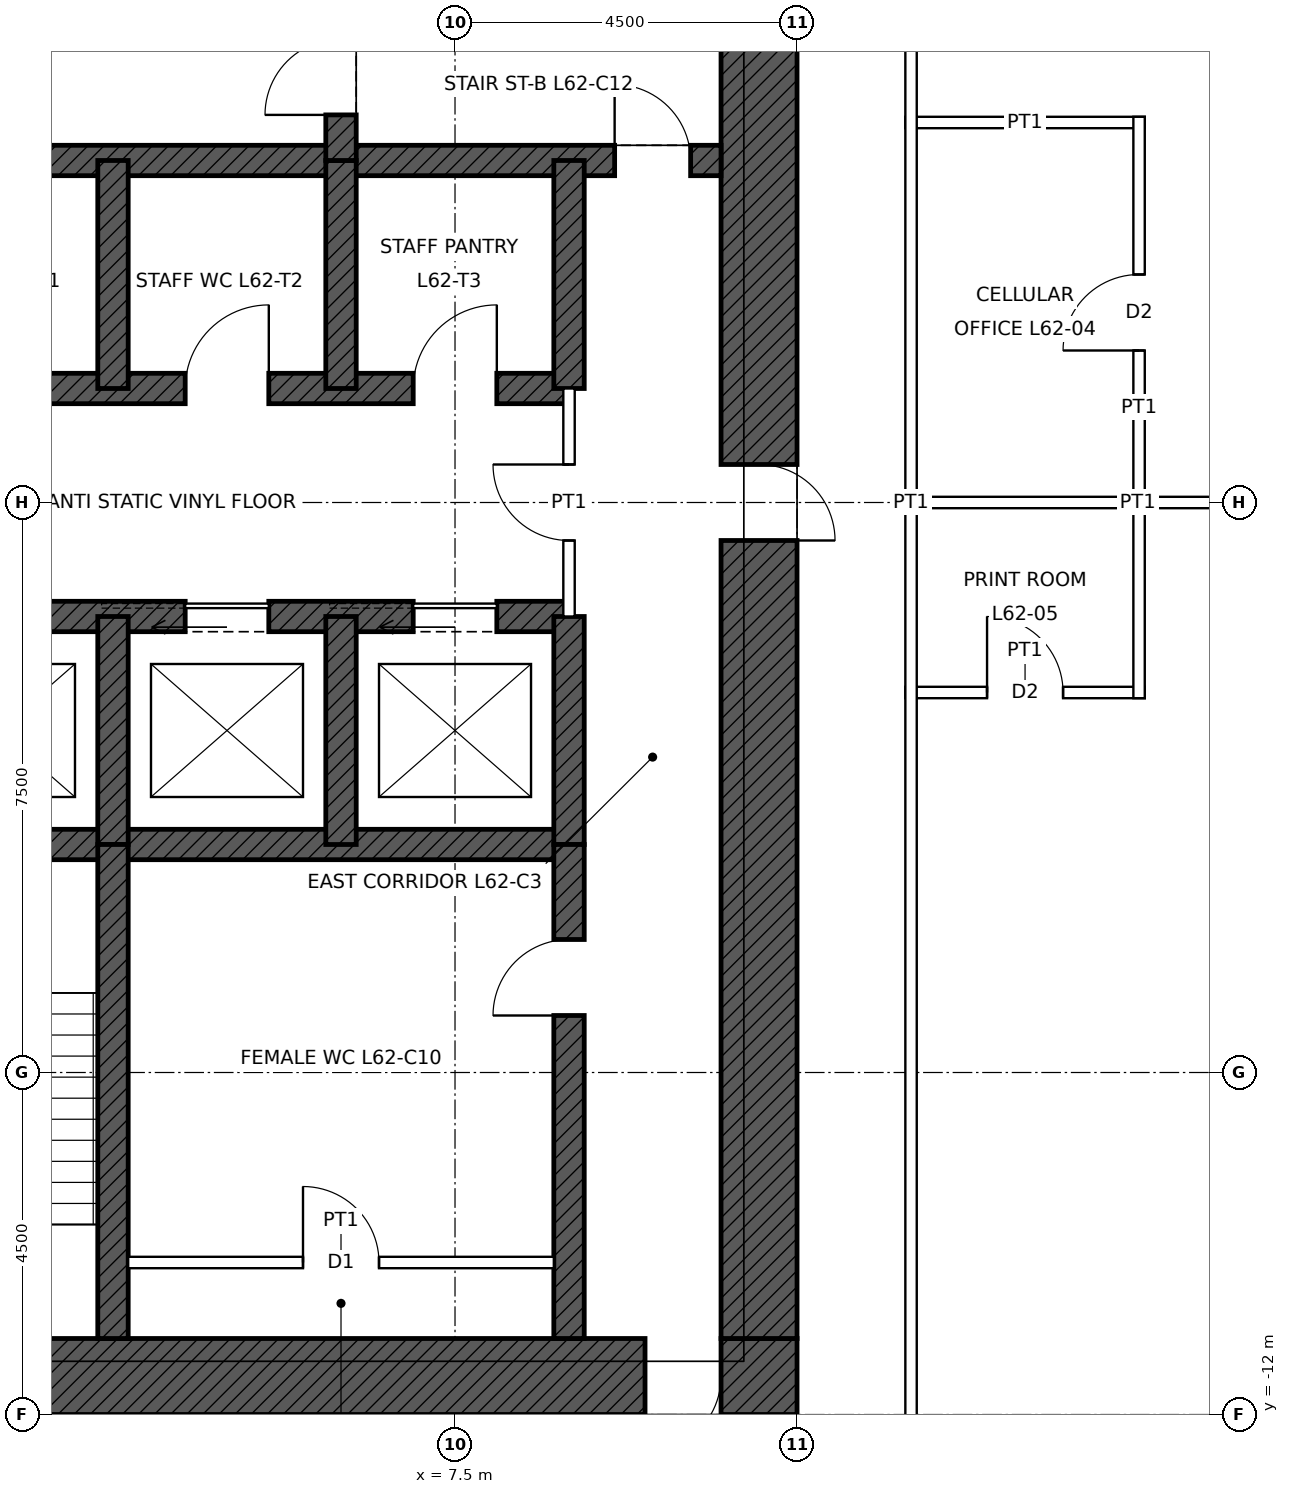
"""IFC4 building model, lengths in metres.
Left out: names, types, materials, properties, quantities, classifications, styles, units other than length and angle.
Written with IfcOpenShell. Run it as: python <this file> out.ifc"""

import sys

from ifc_helpers import new_model, si_unit, direction, frame, frame_2d, origin, place, context, subcontext, project, spatial, rectangle, extrude, element, fill, save


model = new_model("IFC4")
c1 = context("Model", 3, precision=1e-05, world=origin(), true_north=direction((0.0, 1.0)))
c2 = subcontext(c1, "Body", "Model", "MODEL_VIEW")
j1 = project(units=[si_unit("LENGTHUNIT", "METRE"), si_unit("PLANEANGLEUNIT", "RADIAN")], contexts=[c1])
p1 = place(None, origin())
s1 = spatial("IfcSite", under=j1, at=p1, CompositionType="ELEMENT")
p2 = place(p1, origin())
s2 = spatial("IfcBuilding", under=s1, at=p2, CompositionType="ELEMENT")
p3 = place(p2, frame((0.0, 0.0, 283.9)))
s3 = spatial("IfcBuildingStorey", under=s2, at=p3, CompositionType="ELEMENT", Elevation=283.9)
p4 = place(p3, frame((12.0, -11.5, 0.0), z_axis=(0.0, 0.0, 1.0), x_axis=(-1.0, 0.0, 0.0)))
e1 = element("IfcWall", 1, at=p4, inside=s3, PredefinedType="SHEAR", context=c2, shape_type="SweptSolid", body=[
    extrude(rectangle(XDim=24.0, YDim=1.0, at=frame_2d((12.0, 0.0))), origin(), (0.0, 0.0, 1.0), 4.0),
])
p5 = place(p4, frame((11.5, 0.0, 0.0)))
e2 = element("IfcOpeningElement", 2, at=p5, cuts=e1, PredefinedType="OPENING", context=c2, shape_type="SweptSolid", body=[
    extrude(rectangle(XDim=1.0, YDim=2.1, at=frame_2d((0.5, 1.05))), frame((0.0, 0.51, 0.0), z_axis=(0.0, -1.0, 0.0), x_axis=(1.0, 0.0, 0.0)), (0.0, 0.0, 1.0), 1.02),
])
p6 = place(p4, frame((1.0, 0.0, 0.0)))
e3 = element("IfcOpeningElement", 3, at=p6, cuts=e1, PredefinedType="OPENING", context=c2, shape_type="SweptSolid", body=[
    extrude(rectangle(XDim=1.0, YDim=2.4, at=frame_2d((0.5, 1.2))), frame((0.0, 0.51, 0.0), z_axis=(0.0, -1.0, 0.0), x_axis=(1.0, 0.0, 0.0)), (0.0, 0.0, 1.0), 1.02),
])
p7 = place(p3, frame((11.5, 11.0, 0.0), z_axis=(0.0, 0.0, 1.0), x_axis=(0.0, -1.0, 0.0)))
e4 = element("IfcWall", 4, at=p7, inside=s3, PredefinedType="SHEAR", context=c2, shape_type="SweptSolid", body=[
    extrude(rectangle(XDim=22.0, YDim=1.0, at=frame_2d((11.0, 0.0))), origin(), (0.0, 0.0, 1.0), 4.0),
])
p8 = place(p7, frame((10.5, 0.0, 0.0)))
e5 = element("IfcOpeningElement", 5, at=p8, cuts=e4, PredefinedType="OPENING", context=c2, shape_type="SweptSolid", body=[
    extrude(rectangle(XDim=1.0, YDim=2.4, at=frame_2d((0.5, 1.2))), frame((0.0, 0.51, 0.0), z_axis=(0.0, -1.0, 0.0), x_axis=(1.0, 0.0, 0.0)), (0.0, 0.0, 1.0), 1.02),
])
p9 = place(p3, frame((-11.0, 4.5, 0.0), z_axis=(0.0, 0.0, 1.0), x_axis=(1.0, 0.0, 0.0)))
e6 = element("IfcWall", 6, at=p9, inside=s3, PredefinedType="SHEAR", context=c2, shape_type="SweptSolid", body=[
    extrude(rectangle(XDim=22.0, YDim=0.4, at=frame_2d((11.0, 0.0))), origin(), (0.0, 0.0, 1.0), 4.0),
])
p10 = place(p9, frame((0.4, 0.0, 0.0)))
e7 = element("IfcOpeningElement", 7, at=p10, cuts=e6, PredefinedType="OPENING", context=c2, shape_type="SweptSolid", body=[
    extrude(rectangle(XDim=1.0, YDim=2.1, at=frame_2d((0.5, 1.05))), frame((0.0, 0.21, 0.0), z_axis=(0.0, -1.0, 0.0), x_axis=(1.0, 0.0, 0.0)), (0.0, 0.0, 1.0), 0.42),
])
p11 = place(p9, frame((20.6, 0.0, 0.0)))
e8 = element("IfcOpeningElement", 8, at=p11, cuts=e6, PredefinedType="OPENING", context=c2, shape_type="SweptSolid", body=[
    extrude(rectangle(XDim=1.0, YDim=2.1, at=frame_2d((0.5, 1.05))), frame((0.0, 0.21, 0.0), z_axis=(0.0, -1.0, 0.0), x_axis=(1.0, 0.0, 0.0)), (0.0, 0.0, 1.0), 0.42),
])
p12 = place(p3, frame((-9.0, 1.5, 0.0), z_axis=(0.0, 0.0, 1.0), x_axis=(1.0, 0.0, 0.0)))
e9 = element("IfcWall", 9, at=p12, inside=s3, PredefinedType="SHEAR", context=c2, shape_type="SweptSolid", body=[
    extrude(rectangle(XDim=18.0, YDim=0.4, at=frame_2d((9.0, 0.0))), origin(), (0.0, 0.0, 1.0), 4.0),
])
p13 = place(p12, frame((0.95, 0.0, 0.0)))
e10 = element("IfcOpeningElement", 10, at=p13, cuts=e9, PredefinedType="OPENING", context=c2, shape_type="SweptSolid", body=[
    extrude(rectangle(XDim=1.1, YDim=2.1, at=frame_2d((0.55, 1.05))), frame((0.0, 0.21, 0.0), z_axis=(0.0, -1.0, 0.0), x_axis=(1.0, 0.0, 0.0)), (0.0, 0.0, 1.0), 0.42),
])
p14 = place(p12, frame((3.95, 0.0, 0.0)))
e11 = element("IfcOpeningElement", 11, at=p14, cuts=e9, PredefinedType="OPENING", context=c2, shape_type="SweptSolid", body=[
    extrude(rectangle(XDim=1.1, YDim=2.1, at=frame_2d((0.55, 1.05))), frame((0.0, 0.21, 0.0), z_axis=(0.0, -1.0, 0.0), x_axis=(1.0, 0.0, 0.0)), (0.0, 0.0, 1.0), 0.42),
])
p15 = place(p12, frame((6.95, 0.0, 0.0)))
e12 = element("IfcOpeningElement", 12, at=p15, cuts=e9, PredefinedType="OPENING", context=c2, shape_type="SweptSolid", body=[
    extrude(rectangle(XDim=1.1, YDim=2.1, at=frame_2d((0.55, 1.05))), frame((0.0, 0.21, 0.0), z_axis=(0.0, -1.0, 0.0), x_axis=(1.0, 0.0, 0.0)), (0.0, 0.0, 1.0), 0.42),
])
p16 = place(p12, frame((9.95, 0.0, 0.0)))
e13 = element("IfcOpeningElement", 13, at=p16, cuts=e9, PredefinedType="OPENING", context=c2, shape_type="SweptSolid", body=[
    extrude(rectangle(XDim=1.1, YDim=2.1, at=frame_2d((0.55, 1.05))), frame((0.0, 0.21, 0.0), z_axis=(0.0, -1.0, 0.0), x_axis=(1.0, 0.0, 0.0)), (0.0, 0.0, 1.0), 0.42),
])
p17 = place(p12, frame((12.95, 0.0, 0.0)))
e14 = element("IfcOpeningElement", 14, at=p17, cuts=e9, PredefinedType="OPENING", context=c2, shape_type="SweptSolid", body=[
    extrude(rectangle(XDim=1.1, YDim=2.1, at=frame_2d((0.55, 1.05))), frame((0.0, 0.21, 0.0), z_axis=(0.0, -1.0, 0.0), x_axis=(1.0, 0.0, 0.0)), (0.0, 0.0, 1.0), 0.42),
])
p18 = place(p12, frame((15.95, 0.0, 0.0)))
e15 = element("IfcOpeningElement", 15, at=p18, cuts=e9, PredefinedType="OPENING", context=c2, shape_type="SweptSolid", body=[
    extrude(rectangle(XDim=1.1, YDim=2.1, at=frame_2d((0.55, 1.05))), frame((0.0, 0.21, 0.0), z_axis=(0.0, -1.0, 0.0), x_axis=(1.0, 0.0, 0.0)), (0.0, 0.0, 1.0), 0.42),
])
p19 = place(p3, frame((-9.0, -1.5, 0.0), z_axis=(0.0, 0.0, 1.0), x_axis=(1.0, 0.0, 0.0)))
e16 = element("IfcWall", 16, at=p19, inside=s3, PredefinedType="SHEAR", context=c2, shape_type="SweptSolid", body=[
    extrude(rectangle(XDim=18.0, YDim=0.4, at=frame_2d((9.0, 0.0))), origin(), (0.0, 0.0, 1.0), 4.0),
])
p20 = place(p19, frame((9.95, 0.0, 0.0)))
e17 = element("IfcOpeningElement", 17, at=p20, cuts=e16, PredefinedType="OPENING", context=c2, shape_type="SweptSolid", body=[
    extrude(rectangle(XDim=1.1, YDim=2.1, at=frame_2d((0.55, 1.05))), frame((0.0, 0.21, 0.0), z_axis=(0.0, -1.0, 0.0), x_axis=(1.0, 0.0, 0.0)), (0.0, 0.0, 1.0), 0.42),
])
p21 = place(p19, frame((12.95, 0.0, 0.0)))
e18 = element("IfcOpeningElement", 18, at=p21, cuts=e16, PredefinedType="OPENING", context=c2, shape_type="SweptSolid", body=[
    extrude(rectangle(XDim=1.1, YDim=2.1, at=frame_2d((0.55, 1.05))), frame((0.0, 0.21, 0.0), z_axis=(0.0, -1.0, 0.0), x_axis=(1.0, 0.0, 0.0)), (0.0, 0.0, 1.0), 0.42),
])
p22 = place(p19, frame((15.95, 0.0, 0.0)))
e19 = element("IfcOpeningElement", 19, at=p22, cuts=e16, PredefinedType="OPENING", context=c2, shape_type="SweptSolid", body=[
    extrude(rectangle(XDim=1.1, YDim=2.1, at=frame_2d((0.55, 1.05))), frame((0.0, 0.21, 0.0), z_axis=(0.0, -1.0, 0.0), x_axis=(1.0, 0.0, 0.0)), (0.0, 0.0, 1.0), 0.42),
])
p23 = place(p19, frame((0.95, 0.0, 0.0)))
e20 = element("IfcOpeningElement", 20, at=p23, cuts=e16, PredefinedType="OPENING", context=c2, shape_type="SweptSolid", body=[
    extrude(rectangle(XDim=1.1, YDim=2.1, at=frame_2d((0.55, 1.05))), frame((0.0, 0.21, 0.0), z_axis=(0.0, -1.0, 0.0), x_axis=(1.0, 0.0, 0.0)), (0.0, 0.0, 1.0), 0.42),
])
p24 = place(p19, frame((3.95, 0.0, 0.0)))
e21 = element("IfcOpeningElement", 21, at=p24, cuts=e16, PredefinedType="OPENING", context=c2, shape_type="SweptSolid", body=[
    extrude(rectangle(XDim=1.1, YDim=2.1, at=frame_2d((0.55, 1.05))), frame((0.0, 0.21, 0.0), z_axis=(0.0, -1.0, 0.0), x_axis=(1.0, 0.0, 0.0)), (0.0, 0.0, 1.0), 0.42),
])
p25 = place(p19, frame((6.95, 0.0, 0.0)))
e22 = element("IfcOpeningElement", 22, at=p25, cuts=e16, PredefinedType="OPENING", context=c2, shape_type="SweptSolid", body=[
    extrude(rectangle(XDim=1.1, YDim=2.1, at=frame_2d((0.55, 1.05))), frame((0.0, 0.21, 0.0), z_axis=(0.0, -1.0, 0.0), x_axis=(1.0, 0.0, 0.0)), (0.0, 0.0, 1.0), 0.42),
])
p26 = place(p3, frame((-9.0, -4.5, 0.0), z_axis=(0.0, 0.0, 1.0), x_axis=(1.0, 0.0, 0.0)))
e23 = element("IfcWall", 23, at=p26, inside=s3, PredefinedType="SHEAR", context=c2, shape_type="SweptSolid", body=[
    extrude(rectangle(XDim=18.0, YDim=0.4, at=frame_2d((9.0, 0.0))), origin(), (0.0, 0.0, 1.0), 4.0),
])
for number, where, z_axis, x_axis in (
    (24, (9.0, 1.5, 0.0), (0.0, 0.0, 1.0), (0.0, 1.0, 0.0)),
    (25, (9.0, -4.5, 0.0), (0.0, 0.0, 1.0), (0.0, 1.0, 0.0)),
    (26, (3.0, 1.5, 0.0), (0.0, 0.0, 1.0), (0.0, 1.0, 0.0)),
    (27, (6.0, 1.5, 0.0), (0.0, 0.0, 1.0), (0.0, 1.0, 0.0)),
    (28, (3.0, -4.5, 0.0), (0.0, 0.0, 1.0), (0.0, 1.0, 0.0)),
    (29, (6.0, -4.5, 0.0), (0.0, 0.0, 1.0), (0.0, 1.0, 0.0)),
):
    element("IfcWall", number, at=place(p3, frame(where, z_axis=z_axis, x_axis=x_axis)), inside=s3, PredefinedType="SHEAR", context=c2, shape_type="SweptSolid", body=[
        extrude(rectangle(XDim=3.0, YDim=0.4, at=frame_2d((1.5, 0.0))), origin(), (0.0, 0.0, 1.0), 4.0),
    ])
p27 = place(p3, frame((6.0, 4.5, 0.0), z_axis=(0.0, 0.0, 1.0), x_axis=(0.0, 1.0, 0.0)))
e30 = element("IfcWall", 30, at=p27, inside=s3, PredefinedType="SHEAR", context=c2, shape_type="SweptSolid", body=[
    extrude(rectangle(XDim=6.5, YDim=0.4, at=frame_2d((3.25, 0.0))), origin(), (0.0, 0.0, 1.0), 4.0),
])
p28 = place(p27, frame((0.6, 0.0, 0.0)))
e31 = element("IfcOpeningElement", 31, at=p28, cuts=e30, PredefinedType="OPENING", context=c2, shape_type="SweptSolid", body=[
    extrude(rectangle(XDim=1.0, YDim=2.1, at=frame_2d((0.5, 1.05))), frame((0.0, 0.21, 0.0), z_axis=(0.0, -1.0, 0.0), x_axis=(1.0, 0.0, 0.0)), (0.0, 0.0, 1.0), 0.42),
])
p29 = place(p3, frame((9.0, -11.0, 0.0), z_axis=(0.0, 0.0, 1.0), x_axis=(0.0, 1.0, 0.0)))
e32 = element("IfcWall", 32, at=p29, inside=s3, PredefinedType="SHEAR", context=c2, shape_type="SweptSolid", body=[
    extrude(rectangle(XDim=6.5, YDim=0.4, at=frame_2d((3.25, 0.0))), origin(), (0.0, 0.0, 1.0), 4.0),
])
p30 = place(p29, frame((4.25, 0.0, 0.0)))
e33 = element("IfcOpeningElement", 33, at=p30, cuts=e32, PredefinedType="OPENING", context=c2, shape_type="SweptSolid", body=[
    extrude(rectangle(XDim=1.0, YDim=2.1, at=frame_2d((0.5, 1.05))), frame((0.0, 0.21, 0.0), z_axis=(0.0, -1.0, 0.0), x_axis=(1.0, 0.0, 0.0)), (0.0, 0.0, 1.0), 0.42),
])
p31 = place(p3, frame((3.0, -11.0, 0.0), z_axis=(0.0, 0.0, 1.0), x_axis=(0.0, 1.0, 0.0)))
e34 = element("IfcWall", 34, at=p31, inside=s3, PredefinedType="SHEAR", context=c2, shape_type="SweptSolid", body=[
    extrude(rectangle(XDim=6.5, YDim=0.4, at=frame_2d((3.25, 0.0))), origin(), (0.0, 0.0, 1.0), 4.0),
])
p32 = place(p3, frame((13.425, -2.5, 0.0), z_axis=(0.0, 0.0, 1.0), x_axis=(1.0, 0.0, 0.0)))
e35 = element("IfcWall", 35, at=p32, inside=s3, PredefinedType="PARTITIONING", context=c2, shape_type="SweptSolid", body=[
    extrude(rectangle(XDim=3.15, YDim=0.15, at=frame_2d((1.575, 0.0))), origin(), (0.0, 0.0, 1.0), 3.85),
])
p33 = place(p32, frame((1.075, 0.0, 0.0)))
e36 = element("IfcOpeningElement", 36, at=p33, cuts=e35, PredefinedType="OPENING", context=c2, shape_type="SweptSolid", body=[
    extrude(rectangle(XDim=1.0, YDim=2.1, at=frame_2d((0.5, 1.05))), frame((0.0, 0.085, 0.0), z_axis=(0.0, -1.0, 0.0), x_axis=(1.0, 0.0, 0.0)), (0.0, 0.0, 1.0), 0.17),
])
p34 = place(p3, frame((13.425, 0.0, 0.0), z_axis=(0.0, 0.0, 1.0), x_axis=(1.0, 0.0, 0.0)))
e37 = element("IfcWall", 37, at=p34, inside=s3, PredefinedType="PARTITIONING", context=c2, shape_type="SweptSolid", body=[
    extrude(rectangle(XDim=6.115, YDim=0.15, at=frame_2d((3.058, 0.0))), origin(), (0.0, 0.0, 1.0), 3.243),
])
p35 = place(p3, frame((13.425, 5.0, 0.0), z_axis=(0.0, 0.0, 1.0), x_axis=(1.0, 0.0, 0.0)))
e38 = element("IfcWall", 38, at=p35, inside=s3, PredefinedType="PARTITIONING", context=c2, shape_type="SweptSolid", body=[
    extrude(rectangle(XDim=3.15, YDim=0.15, at=frame_2d((1.575, 0.0))), origin(), (0.0, 0.0, 1.0), 3.85),
])
p36 = place(p3, frame((13.5, -13.575, 0.0), z_axis=(0.0, 0.0, 1.0), x_axis=(0.0, 1.0, 0.0)))
e39 = element("IfcWall", 39, at=p36, inside=s3, PredefinedType="PARTITIONING", context=c2, shape_type="SweptSolid", body=[
    extrude(rectangle(XDim=27.15, YDim=0.15, at=frame_2d((13.575, 0.0))), origin(), (0.0, 0.0, 1.0), 3.85),
])
p37 = place(p3, frame((16.5, -2.575, 0.0), z_axis=(0.0, 0.0, 1.0), x_axis=(0.0, 1.0, 0.0)))
e40 = element("IfcWall", 40, at=p37, inside=s3, PredefinedType="PARTITIONING", context=c2, shape_type="SweptSolid", body=[
    extrude(rectangle(XDim=7.65, YDim=0.15, at=frame_2d((3.825, 0.0))), origin(), (0.0, 0.0, 1.0), 3.85),
])
p38 = place(p37, frame((4.575, 0.0, 0.0)))
e41 = element("IfcOpeningElement", 41, at=p38, cuts=e40, PredefinedType="OPENING", context=c2, shape_type="SweptSolid", body=[
    extrude(rectangle(XDim=1.0, YDim=2.1, at=frame_2d((0.5, 1.05))), frame((0.0, 0.085, 0.0), z_axis=(0.0, -1.0, 0.0), x_axis=(1.0, 0.0, 0.0)), (0.0, 0.0, 1.0), 0.17),
])
p39 = place(p3, frame((3.2, -10.0, 0.0), z_axis=(0.0, 0.0, 1.0), x_axis=(1.0, 0.0, 0.0)))
e42 = element("IfcWall", 42, at=p39, inside=s3, PredefinedType="PARTITIONING", context=c2, shape_type="SweptSolid", body=[
    extrude(rectangle(XDim=5.6, YDim=0.15, at=frame_2d((2.8, 0.0))), origin(), (0.0, 0.0, 1.0), 3.75),
])
p40 = place(p39, frame((2.3, 0.0, 0.0)))
e43 = element("IfcOpeningElement", 43, at=p40, cuts=e42, PredefinedType="OPENING", context=c2, shape_type="SweptSolid", body=[
    extrude(rectangle(XDim=1.0, YDim=2.1, at=frame_2d((0.5, 1.05))), frame((0.0, 0.085, 0.0), z_axis=(0.0, -1.0, 0.0), x_axis=(1.0, 0.0, 0.0)), (0.0, 0.0, 1.0), 0.17),
])
p41 = place(p3, frame((9.0, -1.5, 0.0), z_axis=(0.0, 0.0, 1.0), x_axis=(0.0, 1.0, 0.0)))
e44 = element("IfcWall", 44, at=p41, inside=s3, PredefinedType="PARTITIONING", context=c2, shape_type="SweptSolid", body=[
    extrude(rectangle(XDim=3.0, YDim=0.15, at=frame_2d((1.5, 0.0))), origin(), (0.0, 0.0, 1.0), 3.75),
])
p42 = place(p41, frame((1.0, 0.0, 0.0)))
e45 = element("IfcOpeningElement", 45, at=p42, cuts=e44, PredefinedType="OPENING", context=c2, shape_type="SweptSolid", body=[
    extrude(rectangle(XDim=1.0, YDim=2.4, at=frame_2d((0.5, 1.2))), frame((0.0, 0.085, 0.0), z_axis=(0.0, -1.0, 0.0), x_axis=(1.0, 0.0, 0.0)), (0.0, 0.0, 1.0), 0.17),
])
p43 = place(p11, origin())
e46 = element("IfcDoor", 46, at=p43, inside=s3, OperationType="SINGLE_SWING_LEFT", PredefinedType="DOOR", context=c2, shape_type="SweptSolid", body=[
    extrude(rectangle(XDim=1.0, YDim=2.1, at=frame_2d((0.5, 1.05))), frame((0.0, 0.025, 0.0), z_axis=(0.0, -1.0, 0.0), x_axis=(1.0, 0.0, 0.0)), (0.0, 0.0, 1.0), 0.05),
])
fill(e8, e46)
p44 = place(p28, origin())
e47 = element("IfcDoor", 47, at=p44, inside=s3, OperationType="SINGLE_SWING_LEFT", PredefinedType="DOOR", context=c2, shape_type="SweptSolid", body=[
    extrude(rectangle(XDim=1.0, YDim=2.1, at=frame_2d((0.5, 1.05))), frame((0.0, 0.025, 0.0), z_axis=(0.0, -1.0, 0.0), x_axis=(1.0, 0.0, 0.0)), (0.0, 0.0, 1.0), 0.05),
])
fill(e31, e47)
p45 = place(p8, origin())
e48 = element("IfcDoor", 48, at=p45, inside=s3, OperationType="SINGLE_SWING_RIGHT", PredefinedType="DOOR", context=c2, shape_type="SweptSolid", body=[
    extrude(rectangle(XDim=1.0, YDim=2.4, at=frame_2d((0.5, 1.2))), frame((0.0, 0.485, 0.0), z_axis=(0.0, -1.0, 0.0), x_axis=(1.0, 0.0, 0.0)), (0.0, 0.0, 1.0), 0.05),
])
fill(e5, e48)
p46 = place(p6, origin())
e49 = element("IfcDoor", 49, at=p46, inside=s3, OperationType="SINGLE_SWING_RIGHT", PredefinedType="DOOR", context=c2, shape_type="SweptSolid", body=[
    extrude(rectangle(XDim=1.0, YDim=2.4, at=frame_2d((0.5, 1.2))), frame((0.0, 0.485, 0.0), z_axis=(0.0, -1.0, 0.0), x_axis=(1.0, 0.0, 0.0)), (0.0, 0.0, 1.0), 0.05),
])
fill(e3, e49)
p47 = place(p30, origin())
e50 = element("IfcDoor", 50, at=p47, inside=s3, OperationType="SINGLE_SWING_LEFT", PredefinedType="DOOR", context=c2, shape_type="SweptSolid", body=[
    extrude(rectangle(XDim=1.0, YDim=2.1, at=frame_2d((0.5, 1.05))), frame((0.0, 0.025, 0.0), z_axis=(0.0, -1.0, 0.0), x_axis=(1.0, 0.0, 0.0)), (0.0, 0.0, 1.0), 0.05),
])
fill(e33, e50)
p48 = place(p21, origin())
e51 = element("IfcDoor", 51, at=p48, inside=s3, OperationType="SLIDING_TO_LEFT", PredefinedType="DOOR", context=c2, shape_type="SweptSolid", body=[
    extrude(rectangle(XDim=1.1, YDim=2.1, at=frame_2d((0.55, 1.05))), frame((0.0, 0.025, 0.0), z_axis=(0.0, -1.0, 0.0), x_axis=(1.0, 0.0, 0.0)), (0.0, 0.0, 1.0), 0.05),
])
fill(e18, e51)
p49 = place(p22, origin())
e52 = element("IfcDoor", 52, at=p49, inside=s3, OperationType="SLIDING_TO_LEFT", PredefinedType="DOOR", context=c2, shape_type="SweptSolid", body=[
    extrude(rectangle(XDim=1.1, YDim=2.1, at=frame_2d((0.55, 1.05))), frame((0.0, 0.025, 0.0), z_axis=(0.0, -1.0, 0.0), x_axis=(1.0, 0.0, 0.0)), (0.0, 0.0, 1.0), 0.05),
])
fill(e19, e52)
p50 = place(p40, origin())
e53 = element("IfcDoor", 53, at=p50, inside=s3, OperationType="SINGLE_SWING_LEFT", PredefinedType="DOOR", context=c2, shape_type="SweptSolid", body=[
    extrude(rectangle(XDim=1.0, YDim=2.1, at=frame_2d((0.5, 1.05))), frame((0.0, 0.025, 0.0), z_axis=(0.0, -1.0, 0.0), x_axis=(1.0, 0.0, 0.0)), (0.0, 0.0, 1.0), 0.05),
])
fill(e43, e53)
p51 = place(p42, origin())
e54 = element("IfcDoor", 54, at=p51, inside=s3, OperationType="SINGLE_SWING_RIGHT", PredefinedType="DOOR", context=c2, shape_type="SweptSolid", body=[
    extrude(rectangle(XDim=1.0, YDim=2.4, at=frame_2d((0.5, 1.2))), frame((0.0, 0.025, 0.0), z_axis=(0.0, -1.0, 0.0), x_axis=(1.0, 0.0, 0.0)), (0.0, 0.0, 1.0), 0.05),
])
fill(e45, e54)
p52 = place(p17, origin())
e55 = element("IfcDoor", 55, at=p52, inside=s3, OperationType="SINGLE_SWING_RIGHT", PredefinedType="DOOR", context=c2, shape_type="SweptSolid", body=[
    extrude(rectangle(XDim=1.1, YDim=2.1, at=frame_2d((0.55, 1.05))), frame((0.0, 0.025, 0.0), z_axis=(0.0, -1.0, 0.0), x_axis=(1.0, 0.0, 0.0)), (0.0, 0.0, 1.0), 0.05),
])
fill(e14, e55)
p53 = place(p18, origin())
e56 = element("IfcDoor", 56, at=p53, inside=s3, OperationType="SINGLE_SWING_RIGHT", PredefinedType="DOOR", context=c2, shape_type="SweptSolid", body=[
    extrude(rectangle(XDim=1.1, YDim=2.1, at=frame_2d((0.55, 1.05))), frame((0.0, 0.025, 0.0), z_axis=(0.0, -1.0, 0.0), x_axis=(1.0, 0.0, 0.0)), (0.0, 0.0, 1.0), 0.05),
])
fill(e15, e56)
p54 = place(p38, origin())
e57 = element("IfcDoor", 57, at=p54, inside=s3, OperationType="SINGLE_SWING_LEFT", PredefinedType="DOOR", context=c2, shape_type="SweptSolid", body=[
    extrude(rectangle(XDim=1.0, YDim=2.1, at=frame_2d((0.5, 1.05))), frame((0.0, 0.025, 0.0), z_axis=(0.0, -1.0, 0.0), x_axis=(1.0, 0.0, 0.0)), (0.0, 0.0, 1.0), 0.05),
])
fill(e41, e57)
p55 = place(p33, origin())
e58 = element("IfcDoor", 58, at=p55, inside=s3, OperationType="SINGLE_SWING_LEFT", PredefinedType="DOOR", context=c2, shape_type="SweptSolid", body=[
    extrude(rectangle(XDim=1.0, YDim=2.1, at=frame_2d((0.5, 1.05))), frame((0.0, 0.025, 0.0), z_axis=(0.0, -1.0, 0.0), x_axis=(1.0, 0.0, 0.0)), (0.0, 0.0, 1.0), 0.05),
])
fill(e36, e58)
save(model, sys.argv[1])
